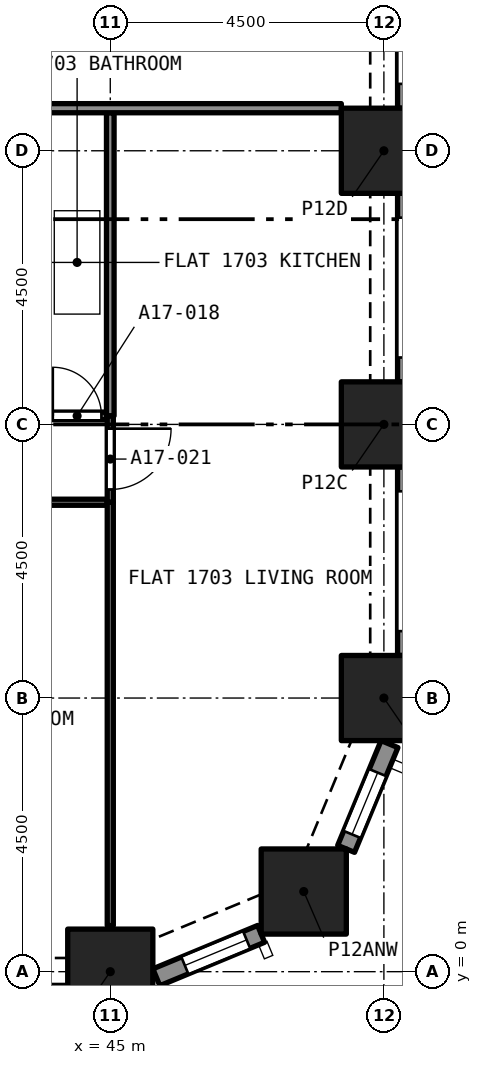
"""IFC4 building model, lengths in metres.
Left out: names, types, materials, properties, quantities, classifications, styles, units other than length and angle.
Written with IfcOpenShell. Run it as: python <this file> out.ifc"""

import sys

from ifc_helpers import new_model, si_unit, direction, frame, frame_2d, origin, origin_2d, place, context, subcontext, project, spatial, rectangle, extrude, element, fill, save


model = new_model("IFC4")
c1 = context("Model", 3, precision=1e-05, world=origin(), true_north=direction((0.0, 1.0)))
c2 = subcontext(c1, "Body", "Model", "MODEL_VIEW")
j1 = project(units=[si_unit("LENGTHUNIT", "METRE"), si_unit("PLANEANGLEUNIT", "RADIAN")], contexts=[c1])
p1 = place(None, origin())
s1 = spatial("IfcSite", under=j1, at=p1, CompositionType="ELEMENT")
p2 = place(p1, origin())
s2 = spatial("IfcBuilding", under=s1, at=p2, CompositionType="ELEMENT")
p3 = place(p2, frame((0.0, 0.0, 65.6)))
s3 = spatial("IfcBuildingStorey", under=s2, at=p3, CompositionType="ELEMENT", Elevation=65.6)
for number, where, z_axis, x_axis in (
    (1, (45.0, 0.0, 0.0), (0.0, 0.0, 1.0), (1.0, 0.0, 0.0)),
    (2, (48.182, 1.318, 0.0), (0.0, 0.0, 1.0), (1.0, 0.0, 0.0)),
    (3, (49.5, 4.5, 0.0), (0.0, 0.0, 1.0), (1.0, 0.0, 0.0)),
    (4, (49.5, 9.0, 0.0), (0.0, 0.0, 1.0), (1.0, 0.0, 0.0)),
    (5, (49.5, 13.5, 0.0), (0.0, 0.0, 1.0), (1.0, 0.0, 0.0)),
):
    element("IfcColumn", number, at=place(p3, frame(where, z_axis=z_axis, x_axis=x_axis)), inside=s3, PredefinedType="COLUMN", context=c2, shape_type="SweptSolid", body=[
        extrude(rectangle(XDim=1.4, YDim=1.4, at=origin_2d()), origin(), (0.0, 0.0, 1.0), 3.2),
    ])
p4 = place(p3, frame((47.48, 0.622, 0.0), z_axis=(0.0, 0.0, 1.0), x_axis=(-0.923903565336, -0.38262540684, 0.0)))
e6 = element("IfcWall", 6, at=p4, inside=s3, PredefinedType="SOLIDWALL", context=c2, shape_type="SweptSolid", body=[
    extrude(rectangle(XDim=1.865, YDim=0.3, at=frame_2d((0.933, 0.0))), origin(), (0.0, 0.0, 1.0), 3.2),
])
p5 = place(p4, frame((0.258, 0.0, 0.45)))
e7 = element("IfcOpeningElement", 7, at=p5, cuts=e6, PredefinedType="OPENING", context=c2, shape_type="SweptSolid", body=[
    extrude(rectangle(XDim=1.1, YDim=1.95, at=frame_2d((0.55, 0.975))), frame((0.0, 0.16, 0.0), z_axis=(0.0, -1.0, 0.0), x_axis=(1.0, 0.0, 0.0)), (0.0, 0.0, 1.0), 0.32),
])
p6 = place(p3, frame((49.592, 3.743, 0.0), z_axis=(0.0, 0.0, 1.0), x_axis=(-0.382737135771, -0.923857286003, 0.0)))
e8 = element("IfcWall", 8, at=p6, inside=s3, PredefinedType="SOLIDWALL", context=c2, shape_type="SweptSolid", body=[
    extrude(rectangle(XDim=1.865, YDim=0.3, at=frame_2d((0.933, 0.0))), origin(), (0.0, 0.0, 1.0), 3.2),
])
p7 = place(p6, frame((0.508, 0.0, 0.45)))
e9 = element("IfcOpeningElement", 9, at=p7, cuts=e8, PredefinedType="OPENING", context=c2, shape_type="SweptSolid", body=[
    extrude(rectangle(XDim=1.1, YDim=1.95, at=frame_2d((0.55, 0.975))), frame((0.0, 0.16, 0.0), z_axis=(0.0, -1.0, 0.0), x_axis=(1.0, 0.0, 0.0)), (0.0, 0.0, 1.0), 0.32),
])
p8 = place(p3, frame((49.875, 8.3, 0.0), z_axis=(0.0, 0.0, 1.0), x_axis=(0.0, -1.0, 0.0)))
e10 = element("IfcWall", 10, at=p8, inside=s3, PredefinedType="SOLIDWALL", context=c2, shape_type="SweptSolid", body=[
    extrude(rectangle(XDim=3.1, YDim=0.3, at=frame_2d((1.55, 0.0))), origin(), (0.0, 0.0, 1.0), 3.2),
])
p9 = place(p8, frame((0.4, 0.0, 0.45)))
e11 = element("IfcOpeningElement", 11, at=p9, cuts=e10, PredefinedType="OPENING", context=c2, shape_type="SweptSolid", body=[
    extrude(rectangle(XDim=2.3, YDim=1.95, at=frame_2d((1.15, 0.975))), frame((0.0, 0.16, 0.0), z_axis=(0.0, -1.0, 0.0), x_axis=(1.0, 0.0, 0.0)), (0.0, 0.0, 1.0), 0.32),
])
p10 = place(p3, frame((49.875, 12.8, 0.0), z_axis=(0.0, 0.0, 1.0), x_axis=(0.0, -1.0, 0.0)))
e12 = element("IfcWall", 12, at=p10, inside=s3, PredefinedType="SOLIDWALL", context=c2, shape_type="SweptSolid", body=[
    extrude(rectangle(XDim=3.1, YDim=0.3, at=frame_2d((1.55, 0.0))), origin(), (0.0, 0.0, 1.0), 3.2),
])
p11 = place(p10, frame((0.4, 0.0, 0.45)))
e13 = element("IfcOpeningElement", 13, at=p11, cuts=e12, PredefinedType="OPENING", context=c2, shape_type="SweptSolid", body=[
    extrude(rectangle(XDim=2.3, YDim=1.95, at=frame_2d((1.15, 0.975))), frame((0.0, 0.16, 0.0), z_axis=(0.0, -1.0, 0.0), x_axis=(1.0, 0.0, 0.0)), (0.0, 0.0, 1.0), 0.32),
])
p12 = place(p3, frame((49.875, 17.3, 0.0), z_axis=(0.0, 0.0, 1.0), x_axis=(0.0, -1.0, 0.0)))
e14 = element("IfcWall", 14, at=p12, inside=s3, PredefinedType="SOLIDWALL", context=c2, shape_type="SweptSolid", body=[
    extrude(rectangle(XDim=3.1, YDim=0.3, at=frame_2d((1.55, 0.0))), origin(), (0.0, 0.0, 1.0), 3.2),
])
p13 = place(p12, frame((0.4, 0.0, 0.45)))
e15 = element("IfcOpeningElement", 15, at=p13, cuts=e14, PredefinedType="OPENING", context=c2, shape_type="SweptSolid", body=[
    extrude(rectangle(XDim=2.3, YDim=1.95, at=frame_2d((1.15, 0.975))), frame((0.0, 0.16, 0.0), z_axis=(0.0, -1.0, 0.0), x_axis=(1.0, 0.0, 0.0)), (0.0, 0.0, 1.0), 0.32),
])
p14 = place(p3, frame((43.909, 9.14, 0.0), z_axis=(0.0, 0.0, 1.0), x_axis=(1.0, 0.0, 0.0)))
e16 = element("IfcWall", 16, at=p14, inside=s3, PredefinedType="PARTITIONING", context=c2, shape_type="SweptSolid", body=[
    extrude(rectangle(XDim=1.028, YDim=0.125, at=frame_2d((0.514, 0.0))), origin(), (0.0, 0.0, 1.0), 2.9),
])
p15 = place(p14, frame((0.146, 0.0, 0.0)))
e17 = element("IfcOpeningElement", 17, at=p15, cuts=e16, PredefinedType="OPENING", context=c2, shape_type="SweptSolid", body=[
    extrude(rectangle(XDim=0.8, YDim=2.1, at=frame_2d((0.4, 1.05))), frame((0.0, 0.073, 0.0), z_axis=(0.0, -1.0, 0.0), x_axis=(1.0, 0.0, 0.0)), (0.0, 0.0, 1.0), 0.145),
])
p16 = place(p3, frame((45.0, 9.14, 0.0), z_axis=(0.0, 0.0, 1.0), x_axis=(0.0, 1.0, 0.0)))
e18 = element("IfcWall", 18, at=p16, inside=s3, PredefinedType="PARTITIONING", context=c2, shape_type="SweptSolid", body=[
    extrude(rectangle(XDim=4.985, YDim=0.125, at=frame_2d((2.493, 0.0))), origin(), (0.0, 0.0, 1.0), 2.9),
])
p17 = place(p3, frame((44.95, 7.72, 0.0), z_axis=(0.0, 0.0, 1.0), x_axis=(-1.0, 0.0, 0.0)))
e19 = element("IfcWall", 19, at=p17, inside=s3, PredefinedType="PARTITIONING", context=c2, shape_type="SweptSolid", body=[
    extrude(rectangle(XDim=4.35, YDim=0.1, at=frame_2d((2.175, 0.0))), origin(), (0.0, 0.0, 1.0), 2.9),
])
p18 = place(p17, frame((1.75, 0.0, 0.0)))
e20 = element("IfcOpeningElement", 20, at=p18, cuts=e19, PredefinedType="OPENING", context=c2, shape_type="SweptSolid", body=[
    extrude(rectangle(XDim=0.9, YDim=2.1, at=frame_2d((0.45, 1.05))), frame((0.0, 0.06, 0.0), z_axis=(0.0, -1.0, 0.0), x_axis=(1.0, 0.0, 0.0)), (0.0, 0.0, 1.0), 0.12),
])
p19 = place(p3, frame((45.0, 0.758, 0.0), z_axis=(0.0, 0.0, 1.0), x_axis=(0.0, 1.0, 0.0)))
e21 = element("IfcWall", 21, at=p19, inside=s3, PredefinedType="PARTITIONING", context=c2, shape_type="SweptSolid", body=[
    extrude(rectangle(XDim=6.962, YDim=0.1, at=frame_2d((3.481, 0.0))), origin(), (0.0, 0.0, 1.0), 2.9),
])
p20 = place(p3, frame((45.0, 9.14, 0.0), z_axis=(0.0, 0.0, 1.0), x_axis=(0.0, -1.0, 0.0)))
e22 = element("IfcWall", 22, at=p20, inside=s3, PredefinedType="PARTITIONING", context=c2, shape_type="SweptSolid", body=[
    extrude(rectangle(XDim=1.42, YDim=0.1, at=frame_2d((0.71, 0.0))), origin(), (0.0, 0.0, 1.0), 2.9),
])
p21 = place(p20, frame((0.21, 0.0, 0.0)))
e23 = element("IfcOpeningElement", 23, at=p21, cuts=e22, PredefinedType="OPENING", context=c2, shape_type="SweptSolid", body=[
    extrude(rectangle(XDim=1.0, YDim=2.1, at=frame_2d((0.5, 1.05))), frame((0.0, 0.06, 0.0), z_axis=(0.0, -1.0, 0.0), x_axis=(1.0, 0.0, 0.0)), (0.0, 0.0, 1.0), 0.12),
])
p22 = place(p3, frame((42.6, 14.2, 0.0), z_axis=(0.0, 0.0, 1.0), x_axis=(1.0, 0.0, 0.0)))
e24 = element("IfcWall", 24, at=p22, inside=s3, PredefinedType="PARTITIONING", context=c2, shape_type="SweptSolid", body=[
    extrude(rectangle(XDim=6.2, YDim=0.15, at=frame_2d((3.1, 0.0))), origin(), (0.0, 0.0, 1.0), 2.9),
])
p23 = place(p5, origin())
e25 = element("IfcWindow", 25, at=p23, inside=s3, PartitioningType="SINGLE_PANEL", PredefinedType="WINDOW", context=c2, shape_type="SweptSolid", body=[
    extrude(rectangle(XDim=1.1, YDim=1.95, at=frame_2d((0.55, 0.975))), frame((0.0, 0.03, 0.0), z_axis=(0.0, -1.0, 0.0), x_axis=(1.0, 0.0, 0.0)), (0.0, 0.0, 1.0), 0.06),
])
fill(e7, e25)
p24 = place(p7, origin())
e26 = element("IfcWindow", 26, at=p24, inside=s3, PartitioningType="SINGLE_PANEL", PredefinedType="WINDOW", context=c2, shape_type="SweptSolid", body=[
    extrude(rectangle(XDim=1.1, YDim=1.95, at=frame_2d((0.55, 0.975))), frame((0.0, 0.03, 0.0), z_axis=(0.0, -1.0, 0.0), x_axis=(1.0, 0.0, 0.0)), (0.0, 0.0, 1.0), 0.06),
])
fill(e9, e26)
p25 = place(p15, origin())
e27 = element("IfcDoor", 27, at=p25, inside=s3, OperationType="SINGLE_SWING_RIGHT", PredefinedType="DOOR", context=c2, shape_type="SweptSolid", body=[
    extrude(rectangle(XDim=0.8, YDim=2.1, at=frame_2d((0.4, 1.05))), frame((0.0, 0.025, 0.0), z_axis=(0.0, -1.0, 0.0), x_axis=(1.0, 0.0, 0.0)), (0.0, 0.0, 1.0), 0.05),
])
fill(e17, e27)
p26 = place(p21, origin())
e28 = element("IfcDoor", 28, at=p26, inside=s3, OperationType="SINGLE_SWING_RIGHT", PredefinedType="DOOR", context=c2, shape_type="SweptSolid", body=[
    extrude(rectangle(XDim=1.0, YDim=2.1, at=frame_2d((0.5, 1.05))), frame((0.0, 0.025, 0.0), z_axis=(0.0, -1.0, 0.0), x_axis=(1.0, 0.0, 0.0)), (0.0, 0.0, 1.0), 0.05),
])
fill(e23, e28)
save(model, sys.argv[1])
